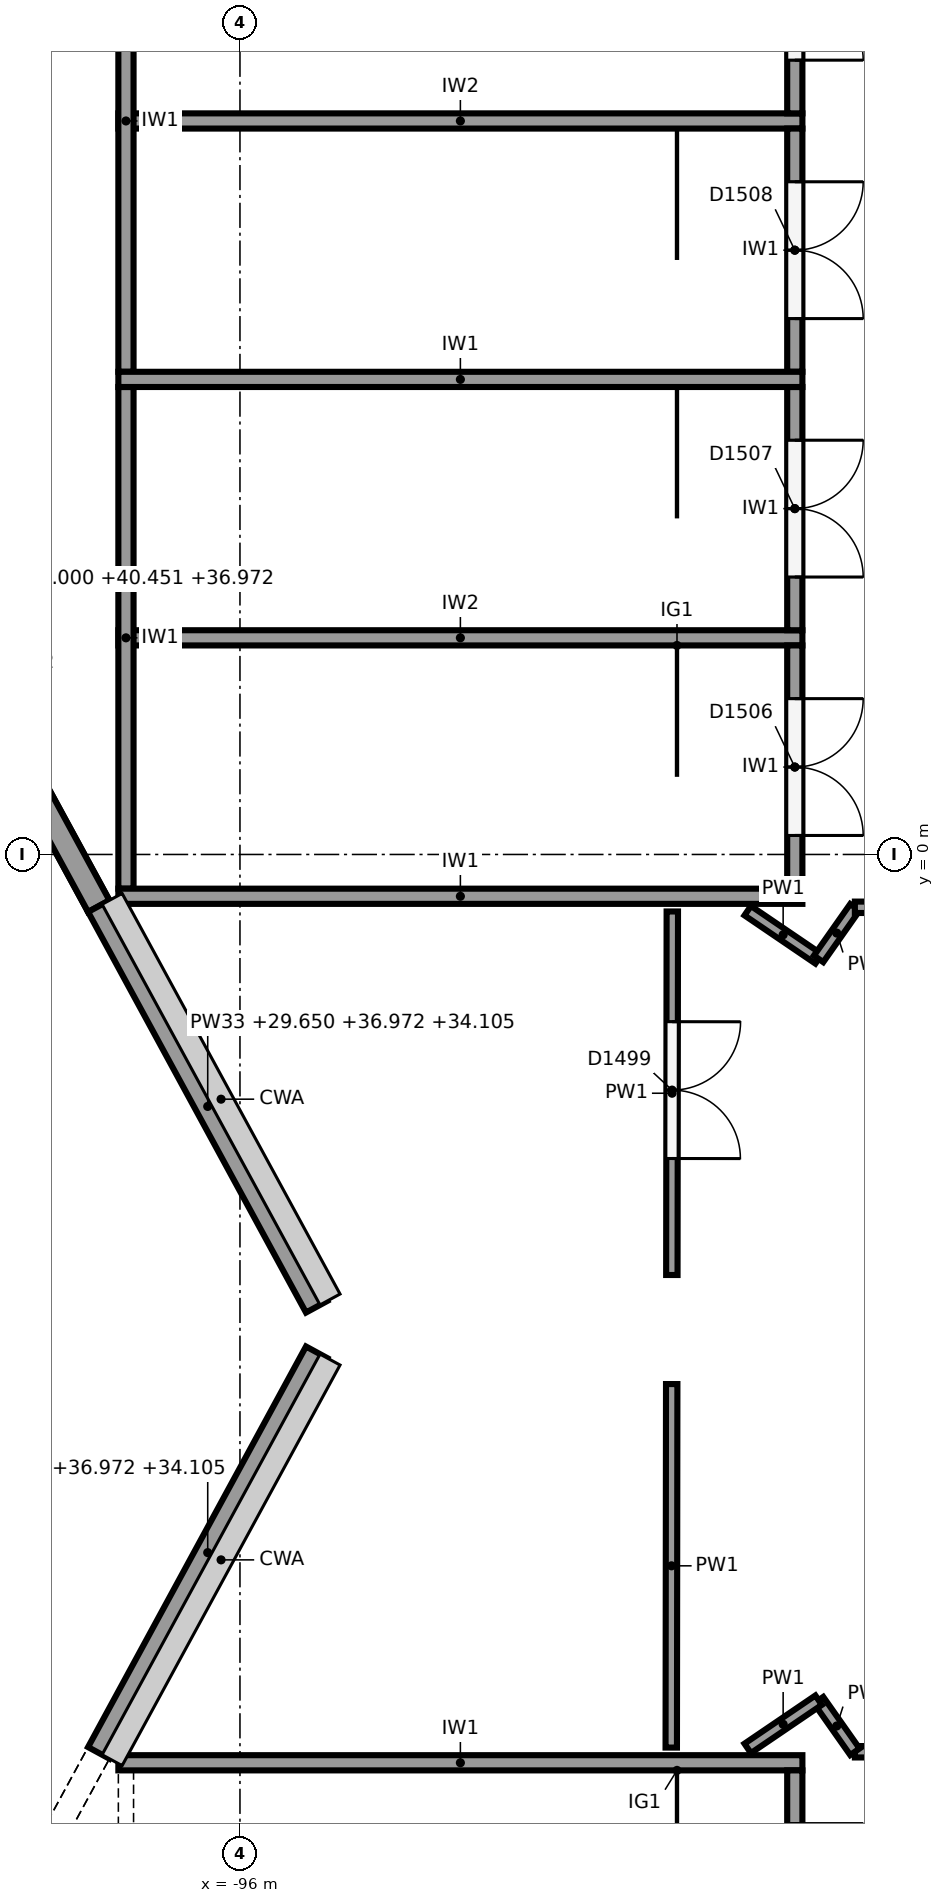
"""IFC4 building model, lengths in metres.
Left out: names, types, materials, properties, quantities, classifications, styles, units other than length and angle.
Written with IfcOpenShell. Run it as: python <this file> out.ifc"""

import sys

from ifc_helpers import new_model, si_unit, direction, frame, frame_2d, origin, origin_2d, place, context, subcontext, project, spatial, polyline, rectangle, circle, outline, extrude, element, fill, save


model = new_model("IFC4")
c1 = context("Model", 3, precision=1e-05, world=origin(), true_north=direction((0.0, 1.0)))
c2 = subcontext(c1, "Body", "Model", "MODEL_VIEW")
j1 = project(units=[si_unit("LENGTHUNIT", "METRE"), si_unit("PLANEANGLEUNIT", "RADIAN")], contexts=[c1])
p1 = place(None, origin())
s1 = spatial("IfcSite", under=j1, at=p1, CompositionType="ELEMENT")
p2 = place(p1, origin())
s2 = spatial("IfcBuilding", under=s1, at=p2, CompositionType="ELEMENT")
p3 = place(p2, frame((0.0, 0.0, 24.0)))
s3 = spatial("IfcBuildingStorey", under=s2, at=p3, CompositionType="ELEMENT", Elevation=24.0)
p4 = place(p3, frame((-94.6, -6.25, 0.0), z_axis=(0.0, 0.0, 1.0), x_axis=(1.0, 0.0, 0.0)))
e1 = element("IfcColumn", 1, at=p4, inside=s3, PredefinedType="COLUMN", context=c2, shape_type="SweptSolid", body=[
    extrude(circle(Radius=0.45, at=origin_2d()), origin(), (0.0, 0.0, 1.0), 6.0),
])
p5 = place(p3, frame((-101.161, 6.689, 0.0), z_axis=(0.0, 0.0, 1.0), x_axis=(0.477867771117, 0.878431780691, 0.0)))
e2 = element("IfcWall", 2, at=p5, inside=s3, PredefinedType="SOLIDWALL", context=c2, shape_type="SweptSolid", body=[
    extrude(rectangle(XDim=13.28, YDim=0.32, at=frame_2d((6.64, 0.0))), origin(), (0.0, 0.0, 1.0), 6.0),
])
p6 = place(p3, frame((-101.337, 6.785, 6.0), z_axis=(0.0, 0.0, 1.0), x_axis=(0.477867771117, 0.878431780691, 0.0)))
e3 = element("IfcWall", 3, at=p6, inside=s3, PredefinedType="SOLIDWALL", context=c2, shape_type="SweptSolid", body=[
    extrude(outline(polyline([(0.0, 0.0), (13.28, 0.0), (13.28, 4.105), (0.0, 10.451), (0.0, 0.0)])), frame((0.0, 0.16, 0.0), z_axis=(0.0, -1.0, 0.0), x_axis=(1.0, 0.0, 0.0)), (0.0, 0.0, 1.0), 0.32),
])
p7 = place(p3, frame((-97.858, -0.68, 0.0), z_axis=(0.0, 0.0, 1.0), x_axis=(-0.477865020076, 0.878433277255, 0.0)))
e4 = element("IfcWall", 4, at=p7, inside=s3, PredefinedType="SOLIDWALL", context=c2, shape_type="SweptSolid", body=[
    extrude(rectangle(XDim=7.28, YDim=0.32, at=frame_2d((3.64, 0.0))), origin(), (0.0, 0.0, 1.0), 6.0),
])
p8 = place(p7, frame((5.25, 0.0, 1.0)))
e5 = element("IfcOpeningElement", 5, at=p8, cuts=e4, PredefinedType="OPENING", context=c2, shape_type="SweptSolid", body=[
    extrude(rectangle(XDim=0.9, YDim=3.25, at=frame_2d((0.45, 1.625))), frame((0.0, 0.17, 0.0), z_axis=(0.0, -1.0, 0.0), x_axis=(1.0, 0.0, 0.0)), (0.0, 0.0, 1.0), 0.34),
])
p9 = place(p3, frame((-97.858, -0.68, 6.0), z_axis=(0.0, 0.0, 1.0), x_axis=(-0.477865020076, 0.878433277255, 0.0)))
e6 = element("IfcWall", 6, at=p9, inside=s3, PredefinedType="SOLIDWALL", context=c2, shape_type="SweptSolid", body=[
    extrude(outline(polyline([(0.0, 0.0), (7.28, 0.0), (7.28, 10.451), (0.0, 6.972), (0.0, 0.0)])), frame((0.0, 0.16, 0.0), z_axis=(0.0, -1.0, 0.0), x_axis=(1.0, 0.0, 0.0)), (0.0, 0.0, 1.0), 0.32),
])
p10 = place(p9, frame((5.25, 0.0, 1.6)))
e7 = element("IfcOpeningElement", 7, at=p10, cuts=e6, PredefinedType="OPENING", context=c2, shape_type="SweptSolid", body=[
    extrude(rectangle(XDim=0.9, YDim=3.0, at=frame_2d((0.45, 1.5))), frame((0.0, 0.17, 0.0), z_axis=(0.0, -1.0, 0.0), x_axis=(1.0, 0.0, 0.0)), (0.0, 0.0, 1.0), 0.34),
])
p11 = place(p3, frame((-94.991, -5.95, 5.65), z_axis=(0.0, 0.0, 1.0), x_axis=(-0.477871109227, 0.878429964747, 0.0)))
e8 = element("IfcWall", 8, at=p11, inside=s3, PredefinedType="SOLIDWALL", context=c2, shape_type="SweptSolid", body=[
    extrude(outline(polyline([(0.0, 0.0), (6.0, 0.0), (6.0, 7.322), (0.0, 4.455), (0.0, 0.0)])), frame((0.0, 0.16, 0.0), z_axis=(0.0, -1.0, 0.0), x_axis=(1.0, 0.0, 0.0)), (0.0, 0.0, 1.0), 0.32),
])
p12 = place(p3, frame((-101.337, -18.215, 0.0), z_axis=(0.0, 0.0, 1.0), x_axis=(0.477865020076, 0.878433277255, 0.0)))
e9 = element("IfcWall", 9, at=p12, inside=s3, PredefinedType="SOLIDWALL", context=c2, shape_type="SweptSolid", body=[
    extrude(rectangle(XDim=7.28, YDim=0.32, at=frame_2d((3.64, 0.0))), origin(), (0.0, 0.0, 1.0), 6.0),
])
p13 = place(p12, frame((1.13, 0.0, 1.0)))
e10 = element("IfcOpeningElement", 10, at=p13, cuts=e9, PredefinedType="OPENING", context=c2, shape_type="SweptSolid", body=[
    extrude(rectangle(XDim=0.9, YDim=3.25, at=frame_2d((0.45, 1.625))), frame((0.0, 0.17, 0.0), z_axis=(0.0, -1.0, 0.0), x_axis=(1.0, 0.0, 0.0)), (0.0, 0.0, 1.0), 0.34),
])
p14 = place(p3, frame((-101.337, -18.215, 6.0), z_axis=(0.0, 0.0, 1.0), x_axis=(0.477865020076, 0.878433277255, 0.0)))
e11 = element("IfcWall", 11, at=p14, inside=s3, PredefinedType="SOLIDWALL", context=c2, shape_type="SweptSolid", body=[
    extrude(outline(polyline([(0.0, 0.0), (7.28, 0.0), (7.28, 6.972), (0.0, 10.451), (0.0, 0.0)])), frame((0.0, 0.16, 0.0), z_axis=(0.0, -1.0, 0.0), x_axis=(1.0, 0.0, 0.0)), (0.0, 0.0, 1.0), 0.32),
])
p15 = place(p14, frame((1.13, 0.0, 1.6)))
e12 = element("IfcOpeningElement", 12, at=p15, cuts=e11, PredefinedType="OPENING", context=c2, shape_type="SweptSolid", body=[
    extrude(rectangle(XDim=0.9, YDim=3.0, at=frame_2d((0.45, 1.5))), frame((0.0, 0.17, 0.0), z_axis=(0.0, -1.0, 0.0), x_axis=(1.0, 0.0, 0.0)), (0.0, 0.0, 1.0), 0.34),
])
p16 = place(p3, frame((-97.858, -11.82, 5.65), z_axis=(0.0, 0.0, 1.0), x_axis=(0.477871109227, 0.878429964747, 0.0)))
e13 = element("IfcWall", 13, at=p16, inside=s3, PredefinedType="SOLIDWALL", context=c2, shape_type="SweptSolid", body=[
    extrude(outline(polyline([(0.0, 0.0), (6.0, 0.0), (6.0, 4.455), (0.0, 7.322), (0.0, 0.0)])), frame((0.0, 0.16, 0.0), z_axis=(0.0, -1.0, 0.0), x_axis=(1.0, 0.0, 0.0)), (0.0, 0.0, 1.0), 0.32),
])
for number, where, z_axis, x_axis in (
    (14, (-97.6, 6.25, 0.0), (0.0, 0.0, 1.0), (1.0, 0.0, 0.0)),
    (15, (-97.6, -0.55, 0.0), (0.0, 0.0, 1.0), (1.0, 0.0, 0.0)),
):
    element("IfcWall", number, at=place(p3, frame(where, z_axis=z_axis, x_axis=x_axis)), inside=s3, PredefinedType="SHEAR", context=c2, shape_type="SweptSolid", body=[
        extrude(rectangle(XDim=9.0, YDim=0.2, at=frame_2d((4.5, 0.0))), origin(), (0.0, 0.0, 1.0), 5.75),
    ])
for number, where, z_axis, x_axis in (
    (16, (-97.5, 12.95, 0.0), (0.0, 0.0, 1.0), (0.0, -1.0, 0.0)),
    (17, (-97.5, 6.15, 0.0), (0.0, 0.0, 1.0), (0.0, -1.0, 0.0)),
):
    element("IfcWall", number, at=place(p3, frame(where, z_axis=z_axis, x_axis=x_axis)), inside=s3, PredefinedType="SHEAR", context=c2, shape_type="SweptSolid", body=[
        extrude(rectangle(XDim=6.6, YDim=0.2, at=frame_2d((3.3, 0.0))), origin(), (0.0, 0.0, 1.0), 5.75),
    ])
for number, where, z_axis, x_axis in (
    (18, (-97.6, 9.65, 0.0), (0.0, 0.0, 1.0), (1.0, 0.0, 0.0)),
    (19, (-97.6, 2.85, 0.0), (0.0, 0.0, 1.0), (1.0, 0.0, 0.0)),
):
    element("IfcWall", number, at=place(p3, frame(where, z_axis=z_axis, x_axis=x_axis)), inside=s3, PredefinedType="SHEAR", context=c2, shape_type="SweptSolid", body=[
        extrude(rectangle(XDim=9.0, YDim=0.2, at=frame_2d((4.5, 0.0))), origin(), (0.0, 0.0, 1.0), 5.75),
    ])
p17 = place(p3, frame((-88.7, 12.95, 0.0), z_axis=(0.0, 0.0, 1.0), x_axis=(0.0, -1.0, 0.0)))
e20 = element("IfcWall", 20, at=p17, inside=s3, PredefinedType="SHEAR", context=c2, shape_type="SweptSolid", body=[
    extrude(rectangle(XDim=3.2, YDim=0.2, at=frame_2d((1.6, 0.0))), origin(), (0.0, 0.0, 1.0), 5.75),
])
p18 = place(p17, frame((0.7, 0.0, 0.0)))
e21 = element("IfcOpeningElement", 21, at=p18, cuts=e20, PredefinedType="OPENING", context=c2, shape_type="SweptSolid", body=[
    extrude(rectangle(XDim=1.8, YDim=2.1, at=frame_2d((0.9, 1.05))), frame((0.0, 0.11, 0.0), z_axis=(0.0, -1.0, 0.0), x_axis=(1.0, 0.0, 0.0)), (0.0, 0.0, 1.0), 0.22),
])
p19 = place(p3, frame((-88.7, 9.55, 0.0), z_axis=(0.0, 0.0, 1.0), x_axis=(0.0, -1.0, 0.0)))
e22 = element("IfcWall", 22, at=p19, inside=s3, PredefinedType="SHEAR", context=c2, shape_type="SweptSolid", body=[
    extrude(rectangle(XDim=3.2, YDim=0.2, at=frame_2d((1.6, 0.0))), origin(), (0.0, 0.0, 1.0), 5.75),
])
p20 = place(p19, frame((0.7, 0.0, 0.0)))
e23 = element("IfcOpeningElement", 23, at=p20, cuts=e22, PredefinedType="OPENING", context=c2, shape_type="SweptSolid", body=[
    extrude(rectangle(XDim=1.8, YDim=2.1, at=frame_2d((0.9, 1.05))), frame((0.0, 0.11, 0.0), z_axis=(0.0, -1.0, 0.0), x_axis=(1.0, 0.0, 0.0)), (0.0, 0.0, 1.0), 0.22),
])
p21 = place(p3, frame((-88.7, 6.15, 0.0), z_axis=(0.0, 0.0, 1.0), x_axis=(0.0, -1.0, 0.0)))
e24 = element("IfcWall", 24, at=p21, inside=s3, PredefinedType="SHEAR", context=c2, shape_type="SweptSolid", body=[
    extrude(rectangle(XDim=3.2, YDim=0.2, at=frame_2d((1.6, 0.0))), origin(), (0.0, 0.0, 1.0), 5.75),
])
p22 = place(p21, frame((0.7, 0.0, 0.0)))
e25 = element("IfcOpeningElement", 25, at=p22, cuts=e24, PredefinedType="OPENING", context=c2, shape_type="SweptSolid", body=[
    extrude(rectangle(XDim=1.8, YDim=2.1, at=frame_2d((0.9, 1.05))), frame((0.0, 0.11, 0.0), z_axis=(0.0, -1.0, 0.0), x_axis=(1.0, 0.0, 0.0)), (0.0, 0.0, 1.0), 0.22),
])
p23 = place(p3, frame((-88.7, 2.75, 0.0), z_axis=(0.0, 0.0, 1.0), x_axis=(0.0, -1.0, 0.0)))
e26 = element("IfcWall", 26, at=p23, inside=s3, PredefinedType="SHEAR", context=c2, shape_type="SweptSolid", body=[
    extrude(rectangle(XDim=3.2, YDim=0.2, at=frame_2d((1.6, 0.0))), origin(), (0.0, 0.0, 1.0), 5.75),
])
p24 = place(p23, frame((0.7, 0.0, 0.0)))
e27 = element("IfcOpeningElement", 27, at=p24, cuts=e26, PredefinedType="OPENING", context=c2, shape_type="SweptSolid", body=[
    extrude(rectangle(XDim=1.8, YDim=2.1, at=frame_2d((0.9, 1.05))), frame((0.0, 0.11, 0.0), z_axis=(0.0, -1.0, 0.0), x_axis=(1.0, 0.0, 0.0)), (0.0, 0.0, 1.0), 0.22),
])
p25 = place(p3, frame((-97.6, -11.95, 0.0), z_axis=(0.0, 0.0, 1.0), x_axis=(1.0, 0.0, 0.0)))
e28 = element("IfcWall", 28, at=p25, inside=s3, PredefinedType="SHEAR", context=c2, shape_type="SweptSolid", body=[
    extrude(rectangle(XDim=9.0, YDim=0.2, at=frame_2d((4.5, 0.0))), origin(), (0.0, 0.0, 1.0), 5.75),
])
p26 = place(p3, frame((-97.5, -12.05, 0.0), z_axis=(0.0, 0.0, 1.0), x_axis=(0.0, -1.0, 0.0)))
e29 = element("IfcWall", 29, at=p26, inside=s3, PredefinedType="SHEAR", context=c2, shape_type="SweptSolid", body=[
    extrude(rectangle(XDim=6.6, YDim=0.2, at=frame_2d((3.3, 0.0))), origin(), (0.0, 0.0, 1.0), 5.75),
])
p27 = place(p3, frame((-88.7, -12.05, 0.0), z_axis=(0.0, 0.0, 1.0), x_axis=(0.0, -1.0, 0.0)))
e30 = element("IfcWall", 30, at=p27, inside=s3, PredefinedType="SHEAR", context=c2, shape_type="SweptSolid", body=[
    extrude(rectangle(XDim=3.2, YDim=0.2, at=frame_2d((1.6, 0.0))), origin(), (0.0, 0.0, 1.0), 5.75),
])
p28 = place(p27, frame((0.7, 0.0, 0.0)))
e31 = element("IfcOpeningElement", 31, at=p28, cuts=e30, PredefinedType="OPENING", context=c2, shape_type="SweptSolid", body=[
    extrude(rectangle(XDim=1.8, YDim=2.1, at=frame_2d((0.9, 1.05))), frame((0.0, 0.11, 0.0), z_axis=(0.0, -1.0, 0.0), x_axis=(1.0, 0.0, 0.0)), (0.0, 0.0, 1.0), 0.22),
])
p29 = place(p3, frame((-90.312, -0.75, 0.0), z_axis=(0.0, 0.0, 1.0), x_axis=(-0.001276160268, -0.999999185707, 0.0)))
e32 = element("IfcWall", 32, at=p29, inside=s3, PredefinedType="PARTITIONING", context=c2, shape_type="SweptSolid", body=[
    extrude(rectangle(XDim=4.783, YDim=0.15, at=frame_2d((2.391, 0.0))), origin(), (0.0, 0.0, 1.0), 5.4),
])
p30 = place(p29, frame((1.45, 0.0, 0.0)))
e33 = element("IfcOpeningElement", 33, at=p30, cuts=e32, PredefinedType="OPENING", context=c2, shape_type="SweptSolid", body=[
    extrude(rectangle(XDim=1.8, YDim=2.1, at=frame_2d((0.9, 1.05))), frame((0.0, 0.085, 0.0), z_axis=(0.0, -1.0, 0.0), x_axis=(1.0, 0.0, 0.0)), (0.0, 0.0, 1.0), 0.17),
])
p31 = place(p3, frame((-90.32, -6.967, 0.0), z_axis=(0.0, 0.0, 1.0), x_axis=(-0.001225113935, -0.999999249548, 0.0)))
e34 = element("IfcWall", 34, at=p31, inside=s3, PredefinedType="PARTITIONING", context=c2, shape_type="SweptSolid", body=[
    extrude(rectangle(XDim=4.783, YDim=0.15, at=frame_2d((2.391, 0.0))), origin(), (0.0, 0.0, 1.0), 5.4),
])
p32 = place(p3, frame((-89.32, -0.74, 0.0), z_axis=(0.0, 0.0, 1.0), x_axis=(0.827055308354, -0.562120553728, 0.0)))
e35 = element("IfcWall", 35, at=p32, inside=s3, PredefinedType="PARTITIONING", context=c2, shape_type="SweptSolid", body=[
    extrude(rectangle(XDim=1.128, YDim=0.15, at=frame_2d((0.564, 0.0))), origin(), (0.0, 0.0, 1.0), 5.4),
])
p33 = place(p3, frame((-88.387, -1.374, 0.0), z_axis=(0.0, 0.0, 1.0), x_axis=(0.575376756214, 0.817888493872, 0.0)))
e36 = element("IfcWall", 36, at=p33, inside=s3, PredefinedType="PARTITIONING", context=c2, shape_type="SweptSolid", body=[
    extrude(rectangle(XDim=0.83, YDim=0.15, at=frame_2d((0.415, 0.0))), origin(), (0.0, 0.0, 1.0), 5.4),
])
p34 = place(p3, frame((-87.909, -0.695, 0.0), z_axis=(0.0, 0.0, 1.0), x_axis=(1.0, 0.0, 0.0)))
e37 = element("IfcWall", 37, at=p34, inside=s3, PredefinedType="PARTITIONING", context=c2, shape_type="SweptSolid", body=[
    extrude(rectangle(XDim=3.704, YDim=0.15, at=frame_2d((1.852, 0.0))), origin(), (0.0, 0.0, 1.0), 5.4),
])
p35 = place(p34, frame((0.65, 0.0, 0.0)))
e38 = element("IfcOpeningElement", 38, at=p35, cuts=e37, PredefinedType="OPENING", context=c2, shape_type="SweptSolid", body=[
    extrude(rectangle(XDim=1.8, YDim=2.1, at=frame_2d((0.9, 1.05))), frame((0.0, 0.085, 0.0), z_axis=(0.0, -1.0, 0.0), x_axis=(1.0, 0.0, 0.0)), (0.0, 0.0, 1.0), 0.17),
])
p36 = place(p3, frame((-82.515, -11.805, 0.0), z_axis=(0.0, 0.0, 1.0), x_axis=(-1.0, 0.0, 0.0)))
e39 = element("IfcWall", 39, at=p36, inside=s3, PredefinedType="PARTITIONING", context=c2, shape_type="SweptSolid", body=[
    extrude(rectangle(XDim=5.394, YDim=0.15, at=frame_2d((2.697, 0.0))), origin(), (0.0, 0.0, 1.0), 5.4),
])
p37 = place(p36, frame((1.75, 0.0, 0.0)))
e40 = element("IfcOpeningElement", 40, at=p37, cuts=e39, PredefinedType="OPENING", context=c2, shape_type="SweptSolid", body=[
    extrude(rectangle(XDim=1.8, YDim=2.1, at=frame_2d((0.9, 1.05))), frame((0.0, 0.085, 0.0), z_axis=(0.0, -1.0, 0.0), x_axis=(1.0, 0.0, 0.0)), (0.0, 0.0, 1.0), 0.17),
])
p38 = place(p3, frame((-87.909, -11.805, 0.0), z_axis=(0.0, 0.0, 1.0), x_axis=(-0.575573582652, 0.81774999294, 0.0)))
e41 = element("IfcWall", 41, at=p38, inside=s3, PredefinedType="PARTITIONING", context=c2, shape_type="SweptSolid", body=[
    extrude(rectangle(XDim=0.83, YDim=0.15, at=frame_2d((0.415, 0.0))), origin(), (0.0, 0.0, 1.0), 5.4),
])
p39 = place(p3, frame((-88.387, -11.126, 0.0), z_axis=(0.0, 0.0, 1.0), x_axis=(-0.827055308354, -0.562120553728, 0.0)))
e42 = element("IfcWall", 42, at=p39, inside=s3, PredefinedType="PARTITIONING", context=c2, shape_type="SweptSolid", body=[
    extrude(rectangle(XDim=1.128, YDim=0.15, at=frame_2d((0.564, 0.0))), origin(), (0.0, 0.0, 1.0), 5.4),
])
p40 = place(p18, origin())
e43 = element("IfcDoor", 43, at=p40, inside=s3, OperationType="DOUBLE_DOOR_SINGLE_SWING", PredefinedType="DOOR", context=c2, shape_type="SweptSolid", body=[
    extrude(rectangle(XDim=1.8, YDim=2.1, at=frame_2d((0.9, 1.05))), frame((0.0, 0.025, 0.0), z_axis=(0.0, -1.0, 0.0), x_axis=(1.0, 0.0, 0.0)), (0.0, 0.0, 1.0), 0.05),
])
fill(e21, e43)
p41 = place(p20, origin())
e44 = element("IfcDoor", 44, at=p41, inside=s3, OperationType="DOUBLE_DOOR_SINGLE_SWING", PredefinedType="DOOR", context=c2, shape_type="SweptSolid", body=[
    extrude(rectangle(XDim=1.8, YDim=2.1, at=frame_2d((0.9, 1.05))), frame((0.0, 0.025, 0.0), z_axis=(0.0, -1.0, 0.0), x_axis=(1.0, 0.0, 0.0)), (0.0, 0.0, 1.0), 0.05),
])
fill(e23, e44)
p42 = place(p22, origin())
e45 = element("IfcDoor", 45, at=p42, inside=s3, OperationType="DOUBLE_DOOR_SINGLE_SWING", PredefinedType="DOOR", context=c2, shape_type="SweptSolid", body=[
    extrude(rectangle(XDim=1.8, YDim=2.1, at=frame_2d((0.9, 1.05))), frame((0.0, 0.025, 0.0), z_axis=(0.0, -1.0, 0.0), x_axis=(1.0, 0.0, 0.0)), (0.0, 0.0, 1.0), 0.05),
])
fill(e25, e45)
p43 = place(p24, origin())
e46 = element("IfcDoor", 46, at=p43, inside=s3, OperationType="DOUBLE_DOOR_SINGLE_SWING", PredefinedType="DOOR", context=c2, shape_type="SweptSolid", body=[
    extrude(rectangle(XDim=1.8, YDim=2.1, at=frame_2d((0.9, 1.05))), frame((0.0, 0.025, 0.0), z_axis=(0.0, -1.0, 0.0), x_axis=(1.0, 0.0, 0.0)), (0.0, 0.0, 1.0), 0.05),
])
fill(e27, e46)
p44 = place(p28, origin())
e47 = element("IfcDoor", 47, at=p44, inside=s3, OperationType="DOUBLE_DOOR_SINGLE_SWING", PredefinedType="DOOR", context=c2, shape_type="SweptSolid", body=[
    extrude(rectangle(XDim=1.8, YDim=2.1, at=frame_2d((0.9, 1.05))), frame((0.0, 0.025, 0.0), z_axis=(0.0, -1.0, 0.0), x_axis=(1.0, 0.0, 0.0)), (0.0, 0.0, 1.0), 0.05),
])
fill(e31, e47)
p45 = place(p30, origin())
e48 = element("IfcDoor", 48, at=p45, inside=s3, OperationType="DOUBLE_DOOR_SINGLE_SWING", PredefinedType="DOOR", context=c2, shape_type="SweptSolid", body=[
    extrude(rectangle(XDim=1.8, YDim=2.1, at=frame_2d((0.9, 1.05))), frame((0.0, 0.025, 0.0), z_axis=(0.0, -1.0, 0.0), x_axis=(1.0, 0.0, 0.0)), (0.0, 0.0, 1.0), 0.05),
])
fill(e33, e48)
save(model, sys.argv[1])
